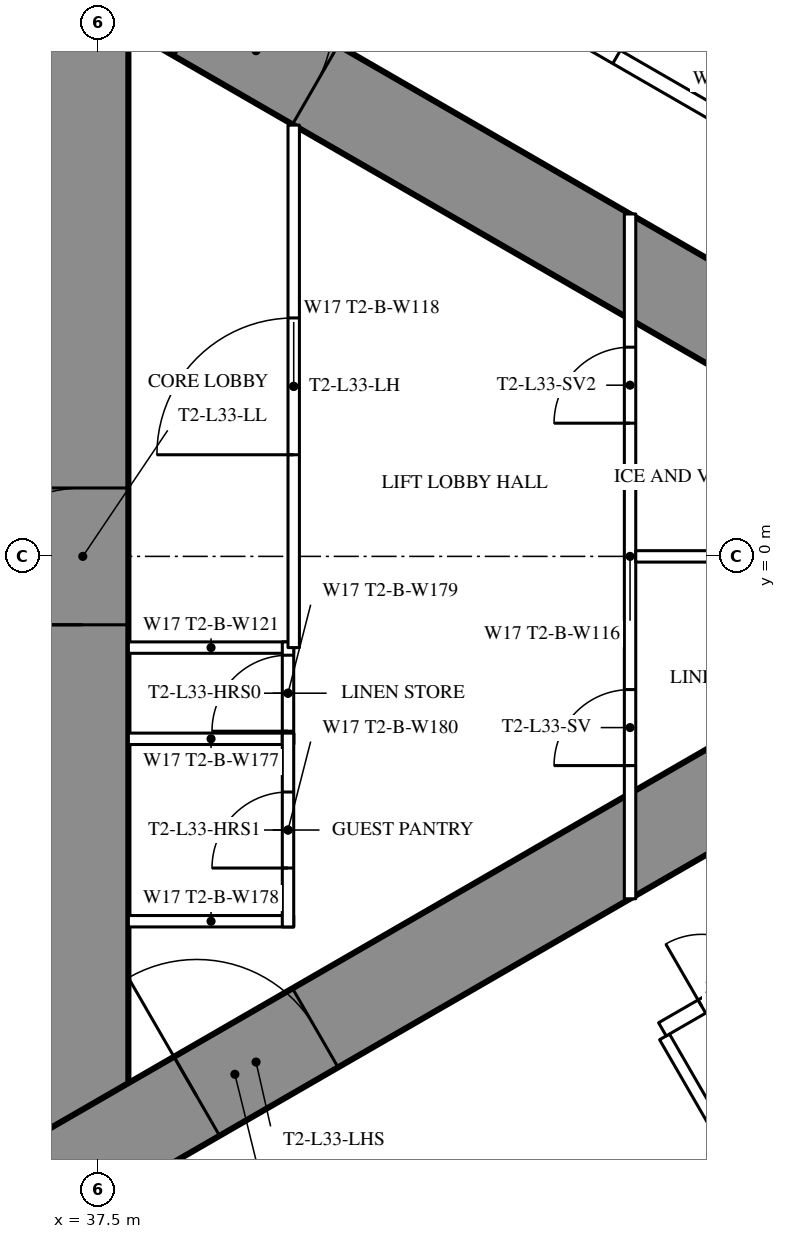
"""IFC4 building model, lengths in metres.
Left out: names, types, materials, properties, quantities, classifications, styles, units other than length and angle.
Written with IfcOpenShell. Run it as: python <this file> out.ifc"""

import sys

from ifc_helpers import new_model, si_unit, direction, frame, frame_2d, origin, place, context, subcontext, project, spatial, rectangle, extrude, element, fill, save


model = new_model("IFC4")
c1 = context("Model", 3, precision=1e-05, world=origin(), true_north=direction((0.0, 1.0)))
c2 = subcontext(c1, "Body", "Model", "MODEL_VIEW")
j1 = project(units=[si_unit("LENGTHUNIT", "METRE"), si_unit("PLANEANGLEUNIT", "RADIAN")], contexts=[c1])
p1 = place(None, origin())
s1 = spatial("IfcSite", under=j1, at=p1, CompositionType="ELEMENT")
p2 = place(p1, origin())
s2 = spatial("IfcBuilding", under=s1, at=p2, CompositionType="ELEMENT")
p3 = place(p2, frame((0.0, 0.0, 125.6)))
s3 = spatial("IfcBuildingStorey", under=s2, at=p3, CompositionType="ELEMENT", Elevation=125.6)
p4 = place(p3, frame((37.3, -8.6, 0.0), z_axis=(0.0, 0.0, 1.0), x_axis=(0.0, 1.0, 0.0)))
e1 = element("IfcWall", 1, at=p4, inside=s3, PredefinedType="SHEAR", context=c2, shape_type="SweptSolid", body=[
    extrude(rectangle(XDim=17.2, YDim=1.2, at=frame_2d((8.6, 0.0))), origin(), (0.0, 0.0, 1.0), 3.5),
])
p5 = place(p4, frame((7.7, 0.0, 0.0)))
e2 = element("IfcOpeningElement", 2, at=p5, cuts=e1, PredefinedType="OPENING", context=c2, shape_type="SweptSolid", body=[
    extrude(rectangle(XDim=1.8, YDim=2.2, at=frame_2d((0.9, 1.1))), frame((0.0, 0.61, 0.0), z_axis=(0.0, -1.0, 0.0), x_axis=(1.0, 0.0, 0.0)), (0.0, 0.0, 1.0), 1.22),
])
p6 = place(p3, frame((27.2, -13.8, 0.0), z_axis=(0.0, 0.0, 1.0), x_axis=(0.866027159892, 0.499996958321, 0.0)))
e3 = element("IfcWall", 3, at=p6, inside=s3, PredefinedType="SHEAR", context=c2, shape_type="SweptSolid", body=[
    extrude(rectangle(XDim=27.947, YDim=1.2, at=frame_2d((13.973, 0.0))), origin(), (0.0, 0.0, 1.0), 3.5),
])
p7 = place(p6, frame((4.6, 0.0, 0.0)))
e4 = element("IfcOpeningElement", 4, at=p7, cuts=e3, PredefinedType="OPENING", context=c2, shape_type="SweptSolid", body=[
    extrude(rectangle(XDim=1.0, YDim=2.2, at=frame_2d((0.5, 1.1))), frame((0.0, 0.61, 0.0), z_axis=(0.0, -1.0, 0.0), x_axis=(1.0, 0.0, 0.0)), (0.0, 0.0, 1.0), 1.22),
])
p8 = place(p6, frame((13.395, 0.0, 0.0)))
e5 = element("IfcOpeningElement", 5, at=p8, cuts=e3, PredefinedType="OPENING", context=c2, shape_type="SweptSolid", body=[
    extrude(rectangle(XDim=1.8, YDim=2.2, at=frame_2d((0.9, 1.1))), frame((0.0, 0.61, 0.0), z_axis=(0.0, -1.0, 0.0), x_axis=(1.0, 0.0, 0.0)), (0.0, 0.0, 1.0), 1.22),
])
p9 = place(p3, frame((27.2, 13.8, 0.0), z_axis=(0.0, 0.0, 1.0), x_axis=(0.866024515034, -0.500001539357, 0.0)))
e6 = element("IfcWall", 6, at=p9, inside=s3, PredefinedType="SHEAR", context=c2, shape_type="SweptSolid", body=[
    extrude(rectangle(XDim=26.907, YDim=1.2, at=frame_2d((13.454, 0.0))), origin(), (0.0, 0.0, 1.0), 3.5),
])
p10 = place(p9, frame((4.6, 0.0, 0.0)))
e7 = element("IfcOpeningElement", 7, at=p10, cuts=e6, PredefinedType="OPENING", context=c2, shape_type="SweptSolid", body=[
    extrude(rectangle(XDim=1.0, YDim=2.2, at=frame_2d((0.5, 1.1))), frame((0.0, 0.61, 0.0), z_axis=(0.0, -1.0, 0.0), x_axis=(1.0, 0.0, 0.0)), (0.0, 0.0, 1.0), 1.22),
])
p11 = place(p9, frame((13.395, 0.0, 0.0)))
e8 = element("IfcOpeningElement", 8, at=p11, cuts=e6, PredefinedType="OPENING", context=c2, shape_type="SweptSolid", body=[
    extrude(rectangle(XDim=1.8, YDim=2.2, at=frame_2d((0.9, 1.1))), frame((0.0, 0.61, 0.0), z_axis=(0.0, -1.0, 0.0), x_axis=(1.0, 0.0, 0.0)), (0.0, 0.0, 1.0), 1.22),
])
p12 = place(p3, frame((44.954, -6.321, 0.0), z_axis=(0.0, 0.0, 1.0), x_axis=(0.500018676722, -0.866014620505, 0.0)))
e9 = element("IfcWall", 9, at=p12, inside=s3, PredefinedType="PARTITIONING", context=c2, shape_type="SweptSolid", body=[
    extrude(rectangle(XDim=8.704, YDim=0.15, at=frame_2d((4.352, 0.0))), origin(), (0.0, 0.0, 1.0), 2.2),
])
p13 = place(p3, frame((36.834, 10.894, 0.0), z_axis=(0.0, 0.0, 1.0), x_axis=(0.866028157229, -0.499995230863, 0.0)))
e10 = element("IfcWall", 10, at=p13, inside=s3, PredefinedType="PARTITIONING", context=c2, shape_type="SweptSolid", body=[
    extrude(rectangle(XDim=21.667, YDim=0.2, at=frame_2d((10.833, 0.0))), origin(), (0.0, 0.0, 1.0), 3.25),
])
p14 = place(p13, frame((20.117, 0.0, 0.0)))
e11 = element("IfcOpeningElement", 11, at=p14, cuts=e10, PredefinedType="OPENING", context=c2, shape_type="SweptSolid", body=[
    extrude(rectangle(XDim=0.95, YDim=2.2, at=frame_2d((0.475, 1.1))), frame((0.0, 0.11, 0.0), z_axis=(0.0, -1.0, 0.0), x_axis=(1.0, 0.0, 0.0)), (0.0, 0.0, 1.0), 0.22),
])
p15 = place(p13, frame((14.04, 0.0, 0.0)))
e12 = element("IfcOpeningElement", 12, at=p15, cuts=e10, PredefinedType="OPENING", context=c2, shape_type="SweptSolid", body=[
    extrude(rectangle(XDim=0.95, YDim=2.2, at=frame_2d((0.475, 1.1))), frame((0.0, 0.11, 0.0), z_axis=(0.0, -1.0, 0.0), x_axis=(1.0, 0.0, 0.0)), (0.0, 0.0, 1.0), 0.22),
])
p16 = place(p13, frame((7.697, 0.0, 0.0)))
e13 = element("IfcOpeningElement", 13, at=p16, cuts=e10, PredefinedType="OPENING", context=c2, shape_type="SweptSolid", body=[
    extrude(rectangle(XDim=0.95, YDim=2.2, at=frame_2d((0.475, 1.1))), frame((0.0, 0.11, 0.0), z_axis=(0.0, -1.0, 0.0), x_axis=(1.0, 0.0, 0.0)), (0.0, 0.0, 1.0), 0.22),
])
p17 = place(p13, frame((3.35, 0.0, 0.0)))
e14 = element("IfcOpeningElement", 14, at=p17, cuts=e10, PredefinedType="OPENING", context=c2, shape_type="SweptSolid", body=[
    extrude(rectangle(XDim=1.0, YDim=2.2, at=frame_2d((0.5, 1.1))), frame((0.0, 0.11, 0.0), z_axis=(0.0, -1.0, 0.0), x_axis=(1.0, 0.0, 0.0)), (0.0, 0.0, 1.0), 0.22),
])
p18 = place(p3, frame((44.925, -6.222, 0.0), z_axis=(0.0, 0.0, 1.0), x_axis=(0.866020269055, 0.500008893506, 0.0)))
e15 = element("IfcWall", 15, at=p18, inside=s3, PredefinedType="PARTITIONING", context=c2, shape_type="SweptSolid", body=[
    extrude(rectangle(XDim=12.444, YDim=0.2, at=frame_2d((6.222, 0.0))), origin(), (0.0, 0.0, 1.0), 3.25),
])
p19 = place(p18, frame((0.6, 0.0, 0.0)))
e16 = element("IfcOpeningElement", 16, at=p19, cuts=e15, PredefinedType="OPENING", context=c2, shape_type="SweptSolid", body=[
    extrude(rectangle(XDim=0.95, YDim=2.2, at=frame_2d((0.475, 1.1))), frame((0.0, 0.11, 0.0), z_axis=(0.0, -1.0, 0.0), x_axis=(1.0, 0.0, 0.0)), (0.0, 0.0, 1.0), 0.22),
])
p20 = place(p18, frame((7.047, 0.0, 0.0)))
e17 = element("IfcOpeningElement", 17, at=p20, cuts=e15, PredefinedType="OPENING", context=c2, shape_type="SweptSolid", body=[
    extrude(rectangle(XDim=0.95, YDim=2.2, at=frame_2d((0.475, 1.1))), frame((0.0, 0.11, 0.0), z_axis=(0.0, -1.0, 0.0), x_axis=(1.0, 0.0, 0.0)), (0.0, 0.0, 1.0), 0.22),
])
for number, where, z_axis, x_axis in (
    (18, (37.9, -1.2, 0.0), (0.0, 0.0, 1.0), (1.0, 0.0, 0.0)),
    (19, (37.9, -2.4, 0.0), (0.0, 0.0, 1.0), (1.0, 0.0, 0.0)),
    (20, (37.9, -4.8, 0.0), (0.0, 0.0, 1.0), (1.0, 0.0, 0.0)),
):
    element("IfcWall", number, at=place(p3, frame(where, z_axis=z_axis, x_axis=x_axis)), inside=s3, PredefinedType="PARTITIONING", context=c2, shape_type="SweptSolid", body=[
        extrude(rectangle(XDim=2.175, YDim=0.15, at=frame_2d((1.087, 0.0))), origin(), (0.0, 0.0, 1.0), 3.25),
    ])
p21 = place(p3, frame((40.0, -2.475, 0.0), z_axis=(0.0, 0.0, 1.0), x_axis=(0.0, 1.0, 0.0)))
e21 = element("IfcWall", 21, at=p21, inside=s3, PredefinedType="PARTITIONING", context=c2, shape_type="SweptSolid", body=[
    extrude(rectangle(XDim=1.35, YDim=0.15, at=frame_2d((0.675, 0.0))), origin(), (0.0, 0.0, 1.0), 3.25),
])
p22 = place(p21, frame((0.175, 0.0, 0.0)))
e22 = element("IfcOpeningElement", 22, at=p22, cuts=e21, PredefinedType="OPENING", context=c2, shape_type="SweptSolid", body=[
    extrude(rectangle(XDim=1.0, YDim=2.2, at=frame_2d((0.5, 1.1))), frame((0.0, 0.085, 0.0), z_axis=(0.0, -1.0, 0.0), x_axis=(1.0, 0.0, 0.0)), (0.0, 0.0, 1.0), 0.17),
])
p23 = place(p3, frame((40.0, -4.875, 0.0), z_axis=(0.0, 0.0, 1.0), x_axis=(0.0, 1.0, 0.0)))
e23 = element("IfcWall", 23, at=p23, inside=s3, PredefinedType="PARTITIONING", context=c2, shape_type="SweptSolid", body=[
    extrude(rectangle(XDim=2.55, YDim=0.15, at=frame_2d((1.275, 0.0))), origin(), (0.0, 0.0, 1.0), 3.25),
])
p24 = place(p23, frame((0.775, 0.0, 0.0)))
e24 = element("IfcOpeningElement", 24, at=p24, cuts=e23, PredefinedType="OPENING", context=c2, shape_type="SweptSolid", body=[
    extrude(rectangle(XDim=1.0, YDim=2.2, at=frame_2d((0.5, 1.1))), frame((0.0, 0.085, 0.0), z_axis=(0.0, -1.0, 0.0), x_axis=(1.0, 0.0, 0.0)), (0.0, 0.0, 1.0), 0.17),
])
p25 = place(p3, frame((40.075, -1.2, 0.0), z_axis=(0.0, 0.0, 1.0), x_axis=(0.0, 1.0, 0.0)))
e25 = element("IfcWall", 25, at=p25, inside=s3, PredefinedType="PARTITIONING", context=c2, shape_type="SweptSolid", body=[
    extrude(rectangle(XDim=6.874, YDim=0.15, at=frame_2d((3.437, 0.0))), origin(), (0.0, 0.0, 1.0), 3.25),
])
p26 = place(p25, frame((2.537, 0.0, 0.0)))
e26 = element("IfcOpeningElement", 26, at=p26, cuts=e25, PredefinedType="OPENING", context=c2, shape_type="SweptSolid", body=[
    extrude(rectangle(XDim=1.8, YDim=2.2, at=frame_2d((0.9, 1.1))), frame((0.0, 0.085, 0.0), z_axis=(0.0, -1.0, 0.0), x_axis=(1.0, 0.0, 0.0)), (0.0, 0.0, 1.0), 0.17),
])
p27 = place(p3, frame((44.5, -4.505, 0.0), z_axis=(0.0, 0.0, 1.0), x_axis=(0.0, 1.0, 0.0)))
e27 = element("IfcWall", 27, at=p27, inside=s3, PredefinedType="PARTITIONING", context=c2, shape_type="SweptSolid", body=[
    extrude(rectangle(XDim=9.009, YDim=0.15, at=frame_2d((4.505, 0.0))), origin(), (0.0, 0.0, 1.0), 2.45),
])
p28 = place(p27, frame((1.752, 0.0, 0.0)))
e28 = element("IfcOpeningElement", 28, at=p28, cuts=e27, PredefinedType="OPENING", context=c2, shape_type="SweptSolid", body=[
    extrude(rectangle(XDim=1.0, YDim=2.2, at=frame_2d((0.5, 1.1))), frame((0.0, 0.085, 0.0), z_axis=(0.0, -1.0, 0.0), x_axis=(1.0, 0.0, 0.0)), (0.0, 0.0, 1.0), 0.17),
])
p29 = place(p27, frame((6.257, 0.0, 0.0)))
e29 = element("IfcOpeningElement", 29, at=p29, cuts=e27, PredefinedType="OPENING", context=c2, shape_type="SweptSolid", body=[
    extrude(rectangle(XDim=1.0, YDim=2.2, at=frame_2d((0.5, 1.1))), frame((0.0, 0.085, 0.0), z_axis=(0.0, -1.0, 0.0), x_axis=(1.0, 0.0, 0.0)), (0.0, 0.0, 1.0), 0.17),
])
p30 = place(p3, frame((44.575, 0.0, 0.0), z_axis=(0.0, 0.0, 1.0), x_axis=(1.0, 0.0, 0.0)))
e30 = element("IfcWall", 30, at=p30, inside=s3, PredefinedType="PARTITIONING", context=c2, shape_type="SweptSolid", body=[
    extrude(rectangle(XDim=7.727, YDim=0.15, at=frame_2d((3.864, 0.0))), origin(), (0.0, 0.0, 1.0), 2.2),
])
p31 = place(p19, origin())
e31 = element("IfcDoor", 31, at=p31, inside=s3, OperationType="SINGLE_SWING_LEFT", PredefinedType="DOOR", context=c2, shape_type="SweptSolid", body=[
    extrude(rectangle(XDim=0.95, YDim=2.2, at=frame_2d((0.475, 1.1))), frame((0.0, 0.025, 0.0), z_axis=(0.0, -1.0, 0.0), x_axis=(1.0, 0.0, 0.0)), (0.0, 0.0, 1.0), 0.05),
])
fill(e16, e31)
p32 = place(p16, origin())
e32 = element("IfcDoor", 32, at=p32, inside=s3, OperationType="SINGLE_SWING_LEFT", PredefinedType="DOOR", context=c2, shape_type="SweptSolid", body=[
    extrude(rectangle(XDim=0.95, YDim=2.2, at=frame_2d((0.475, 1.1))), frame((0.0, 0.025, 0.0), z_axis=(0.0, -1.0, 0.0), x_axis=(1.0, 0.0, 0.0)), (0.0, 0.0, 1.0), 0.05),
])
fill(e13, e32)
p33 = place(p22, origin())
e33 = element("IfcDoor", 33, at=p33, inside=s3, OperationType="SINGLE_SWING_LEFT", PredefinedType="DOOR", context=c2, shape_type="SweptSolid", body=[
    extrude(rectangle(XDim=1.0, YDim=2.2, at=frame_2d((0.5, 1.1))), frame((0.0, 0.025, 0.0), z_axis=(0.0, -1.0, 0.0), x_axis=(1.0, 0.0, 0.0)), (0.0, 0.0, 1.0), 0.05),
])
fill(e22, e33)
p34 = place(p24, origin())
e34 = element("IfcDoor", 34, at=p34, inside=s3, OperationType="SINGLE_SWING_LEFT", PredefinedType="DOOR", context=c2, shape_type="SweptSolid", body=[
    extrude(rectangle(XDim=1.0, YDim=2.2, at=frame_2d((0.5, 1.1))), frame((0.0, 0.025, 0.0), z_axis=(0.0, -1.0, 0.0), x_axis=(1.0, 0.0, 0.0)), (0.0, 0.0, 1.0), 0.05),
])
fill(e24, e34)
p35 = place(p26, origin())
e35 = element("IfcDoor", 35, at=p35, inside=s3, OperationType="DOUBLE_DOOR_SINGLE_SWING", PredefinedType="DOOR", context=c2, shape_type="SweptSolid", body=[
    extrude(rectangle(XDim=1.8, YDim=2.2, at=frame_2d((0.9, 1.1))), frame((0.0, 0.025, 0.0), z_axis=(0.0, -1.0, 0.0), x_axis=(1.0, 0.0, 0.0)), (0.0, 0.0, 1.0), 0.05),
])
fill(e26, e35)
p36 = place(p28, origin())
e36 = element("IfcDoor", 36, at=p36, inside=s3, OperationType="SINGLE_SWING_LEFT", PredefinedType="DOOR", context=c2, shape_type="SweptSolid", body=[
    extrude(rectangle(XDim=1.0, YDim=2.2, at=frame_2d((0.5, 1.1))), frame((0.0, 0.025, 0.0), z_axis=(0.0, -1.0, 0.0), x_axis=(1.0, 0.0, 0.0)), (0.0, 0.0, 1.0), 0.05),
])
fill(e28, e36)
p37 = place(p29, origin())
e37 = element("IfcDoor", 37, at=p37, inside=s3, OperationType="SINGLE_SWING_LEFT", PredefinedType="DOOR", context=c2, shape_type="SweptSolid", body=[
    extrude(rectangle(XDim=1.0, YDim=2.2, at=frame_2d((0.5, 1.1))), frame((0.0, 0.025, 0.0), z_axis=(0.0, -1.0, 0.0), x_axis=(1.0, 0.0, 0.0)), (0.0, 0.0, 1.0), 0.05),
])
fill(e29, e37)
p38 = place(p8, origin())
e38 = element("IfcDoor", 38, at=p38, inside=s3, OperationType="DOUBLE_DOOR_SINGLE_SWING", PredefinedType="DOOR", context=c2, shape_type="SweptSolid", body=[
    extrude(rectangle(XDim=1.8, YDim=2.2, at=frame_2d((0.9, 1.1))), frame((0.0, 0.025, 0.0), z_axis=(0.0, -1.0, 0.0), x_axis=(1.0, 0.0, 0.0)), (0.0, 0.0, 1.0), 0.05),
])
fill(e5, e38)
p39 = place(p11, origin())
e39 = element("IfcDoor", 39, at=p39, inside=s3, OperationType="DOUBLE_DOOR_SINGLE_SWING", PredefinedType="DOOR", context=c2, shape_type="SweptSolid", body=[
    extrude(rectangle(XDim=1.8, YDim=2.2, at=frame_2d((0.9, 1.1))), frame((0.0, 0.025, 0.0), z_axis=(0.0, -1.0, 0.0), x_axis=(1.0, 0.0, 0.0)), (0.0, 0.0, 1.0), 0.05),
])
fill(e8, e39)
p40 = place(p5, origin())
e40 = element("IfcDoor", 40, at=p40, inside=s3, OperationType="DOUBLE_DOOR_SINGLE_SWING", PredefinedType="DOOR", context=c2, shape_type="SweptSolid", body=[
    extrude(rectangle(XDim=1.8, YDim=2.2, at=frame_2d((0.9, 1.1))), frame((0.0, 0.025, 0.0), z_axis=(0.0, -1.0, 0.0), x_axis=(1.0, 0.0, 0.0)), (0.0, 0.0, 1.0), 0.05),
])
fill(e2, e40)
save(model, sys.argv[1])
